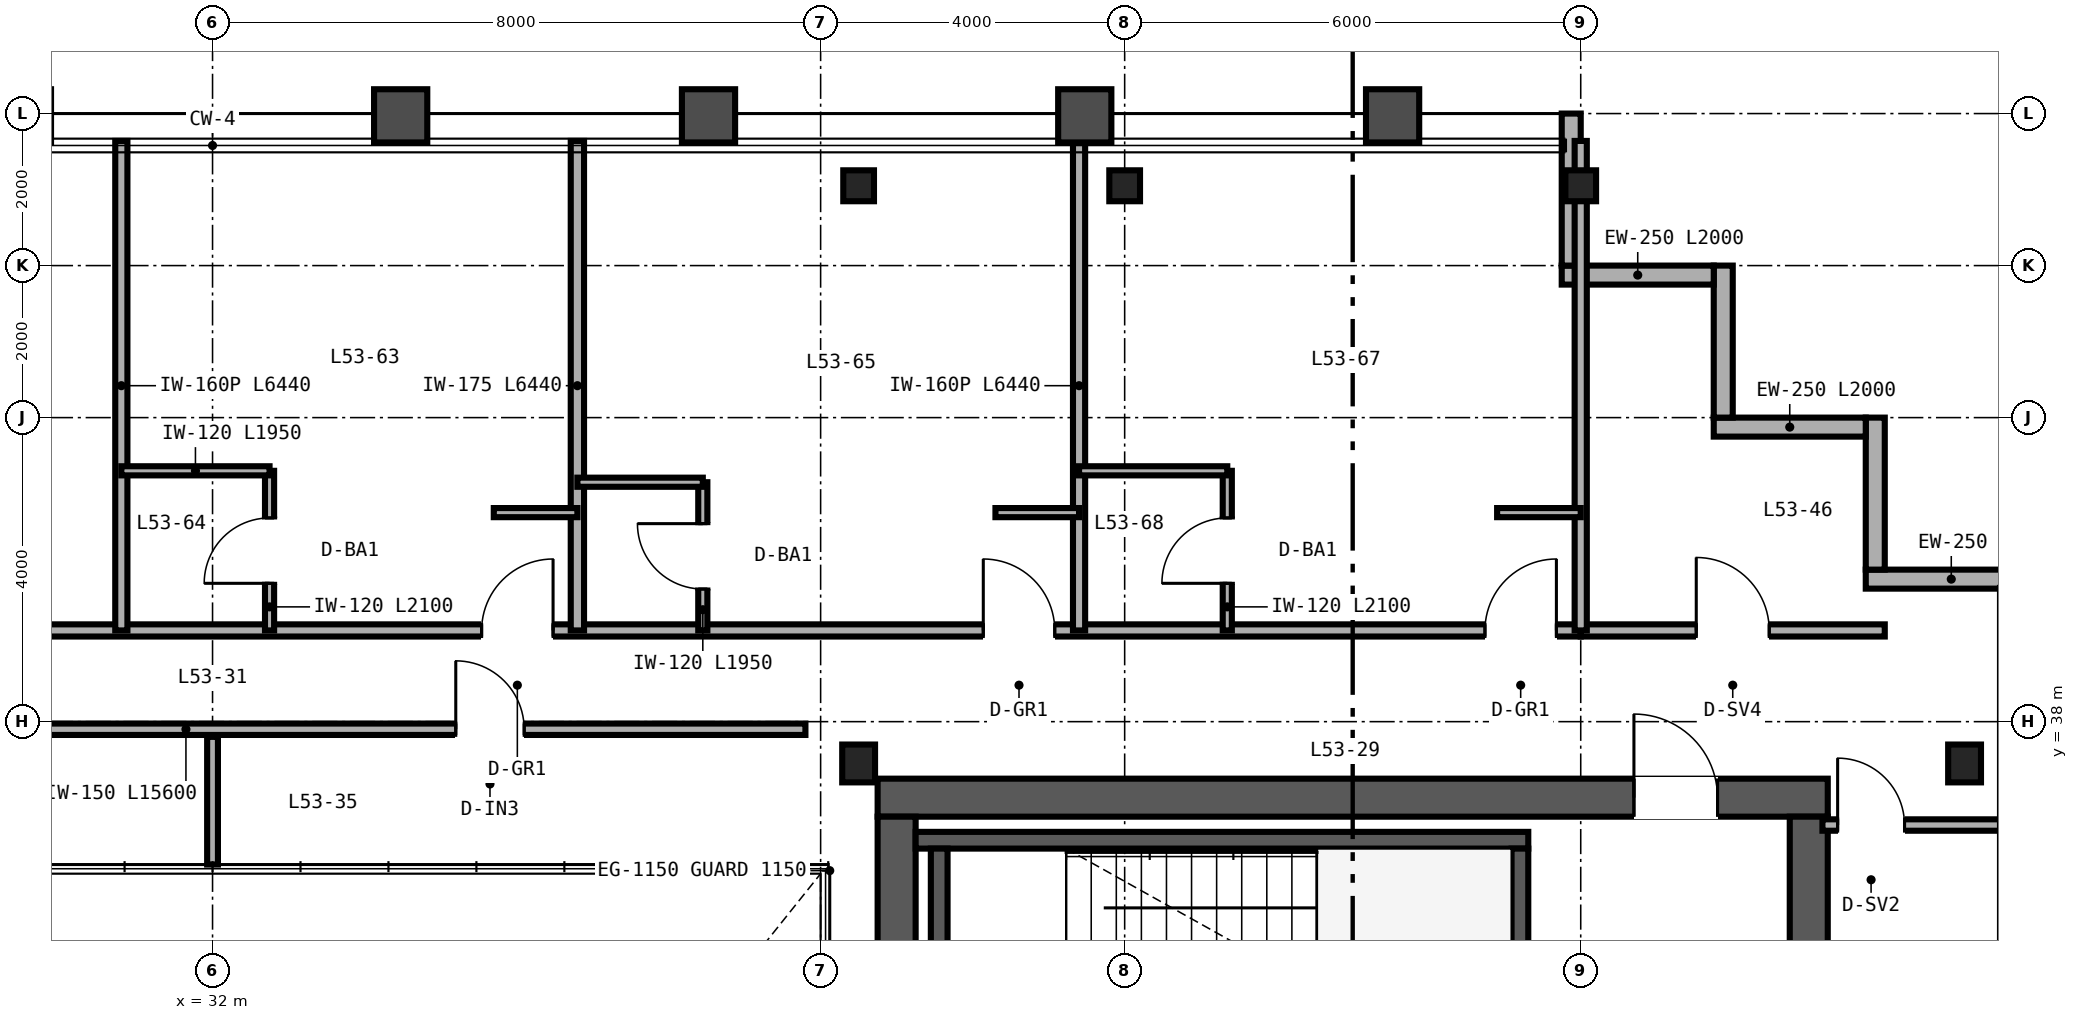
"""IFC4 building model, lengths in metres.
Left out: names, types, materials, properties, quantities, classifications, styles, units other than length and angle.
Written with IfcOpenShell. Run it as: python <this file> out.ifc"""

import sys

from ifc_helpers import new_model, si_unit, direction, frame, frame_2d, origin, origin_2d, place, context, subcontext, project, spatial, rectangle, i_section, extrude, source, transform, mapped, element, fill, save


model = new_model("IFC4")
c1 = context("Model", 3, precision=1e-05, world=origin(), true_north=direction((0.0, 1.0)))
c2 = subcontext(c1, "Body", "Model", "MODEL_VIEW")
j1 = project(units=[si_unit("LENGTHUNIT", "METRE"), si_unit("PLANEANGLEUNIT", "RADIAN")], contexts=[c1])
p1 = place(None, origin())
s1 = spatial("IfcSite", under=j1, at=p1, CompositionType="ELEMENT")
p2 = place(p1, origin())
s2 = spatial("IfcBuilding", under=s1, at=p2, CompositionType="ELEMENT")
p3 = place(p2, frame((0.0, 0.0, 210.0)))
s3 = spatial("IfcBuildingStorey", under=s2, at=p3, CompositionType="ELEMENT", Elevation=210.0)
p4 = place(p3, frame((40.75, 37.0, 0.0), z_axis=(0.0, 0.0, 1.0), x_axis=(1.0, 0.0, 0.0)))
e1 = element("IfcWall", 1, at=p4, inside=s3, PredefinedType="SHEAR", context=c2, shape_type="SweptSolid", body=[
    extrude(rectangle(XDim=12.5, YDim=0.5, at=frame_2d((6.25, 0.0))), origin(), (0.0, 0.0, 1.0), 3.37),
])
p5 = place(p4, frame((9.95, 0.0, 0.0)))
e2 = element("IfcOpeningElement", 2, at=p5, cuts=e1, PredefinedType="OPENING", context=c2, shape_type="SweptSolid", body=[
    extrude(rectangle(XDim=1.1, YDim=2.15, at=frame_2d((0.55, 1.075))), frame((0.0, 0.26, 0.0), z_axis=(0.0, -1.0, 0.0), x_axis=(1.0, 0.0, 0.0)), (0.0, 0.0, 1.0), 0.52),
])
for number, where, z_axis, x_axis in (
    (3, (41.0, 15.25, 0.0), (0.0, 0.0, 1.0), (0.0, 1.0, 0.0)),
    (4, (53.0, 15.25, 0.0), (0.0, 0.0, 1.0), (0.0, 1.0, 0.0)),
):
    element("IfcWall", number, at=place(p3, frame(where, z_axis=z_axis, x_axis=x_axis)), inside=s3, PredefinedType="SHEAR", context=c2, shape_type="SweptSolid", body=[
        extrude(rectangle(XDim=21.5, YDim=0.5, at=frame_2d((10.75, 0.0))), origin(), (0.0, 0.0, 1.0), 3.37),
    ])
p6 = place(p3, frame((41.25, 36.44, 0.0), z_axis=(0.0, 0.0, 1.0), x_axis=(1.0, 0.0, 0.0)))
e5 = element("IfcWall", 5, at=p6, inside=s3, PredefinedType="SHEAR", context=c2, shape_type="SweptSolid", body=[
    extrude(rectangle(XDim=8.06, YDim=0.22, at=frame_2d((4.03, 0.0))), origin(), (0.0, 0.0, 1.0), 3.4),
])
for number, where, z_axis, x_axis in (
    (6, (41.56, 33.05, 0.0), (0.0, 0.0, 1.0), (0.0, 1.0, 0.0)),
    (7, (49.2, 33.05, 0.0), (0.0, 0.0, 1.0), (0.0, 1.0, 0.0)),
):
    element("IfcWall", number, at=place(p3, frame(where, z_axis=z_axis, x_axis=x_axis)), inside=s3, PredefinedType="SHEAR", context=c2, shape_type="SweptSolid", body=[
        extrude(rectangle(XDim=3.28, YDim=0.22, at=frame_2d((1.64, 0.0))), origin(), (0.0, 0.0, 1.0), 3.4),
    ])
m1 = source(origin(), c2, "Body", "SweptSolid", [
    extrude(i_section(OverallWidth=0.432, OverallDepth=0.498, WebThickness=0.056, FlangeThickness=0.089, FilletRadius=0.025, at=origin_2d()), origin(), (0.0, 0.0, 1.0), 3.37),
])
for number, where, z_axis, x_axis in (
    (8, (40.5, 37.45, 0.0), (0.0, 0.0, 1.0), (1.0, 0.0, 0.0)),
    (9, (55.05, 37.45, 0.0), (0.0, 0.0, 1.0), (1.0, 0.0, 0.0)),
):
    element("IfcColumn", number, at=place(p3, frame(where, z_axis=z_axis, x_axis=x_axis)), inside=s3, PredefinedType="COLUMN", context=c2, shape_type="MappedRepresentation", body=[
        mapped(m1, transform((0.0, 0.0, 0.0), scale=1.0)),
    ])
m2 = source(origin(), c2, "Body", "SweptSolid", [
    extrude(i_section(OverallWidth=0.404, OverallDepth=0.407, WebThickness=0.027, FlangeThickness=0.044, FilletRadius=0.025, at=origin_2d()), origin(), (0.0, 0.0, 1.0), 3.37),
])
for number, where, z_axis, x_axis in (
    (10, (40.5, 45.05, 0.0), (0.0, 0.0, 1.0), (1.0, 0.0, 0.0)),
    (11, (44.0, 45.05, 0.0), (0.0, 0.0, 1.0), (1.0, 0.0, 0.0)),
    (12, (50.0, 45.05, 0.0), (0.0, 0.0, 1.0), (1.0, 0.0, 0.0)),
):
    element("IfcColumn", number, at=place(p3, frame(where, z_axis=z_axis, x_axis=x_axis)), inside=s3, PredefinedType="COLUMN", context=c2, shape_type="MappedRepresentation", body=[
        mapped(m2, transform((0.0, 0.0, 0.0), scale=1.0)),
    ])
p7 = place(p3, frame((56.0, 39.875, 0.0), z_axis=(0.0, 0.0, 1.0), x_axis=(-1.0, 0.0, 0.0)))
e13 = element("IfcWall", 13, at=p7, inside=s3, PredefinedType="SOLIDWALL", context=c2, shape_type="SweptSolid", body=[
    extrude(rectangle(XDim=2.25, YDim=0.25, at=frame_2d((1.125, 0.0))), origin(), (0.0, 0.0, 1.0), 3.37),
])
for number, where, z_axis, x_axis in (
    (14, (53.875, 40.0, 0.0), (0.0, 0.0, 1.0), (0.0, 1.0, 0.0)),
    (15, (53.75, 41.875, 0.0), (0.0, 0.0, 1.0), (-1.0, 0.0, 0.0)),
    (16, (51.875, 42.0, 0.0), (0.0, 0.0, 1.0), (0.0, 1.0, 0.0)),
    (17, (51.75, 43.875, 0.0), (0.0, 0.0, 1.0), (-1.0, 0.0, 0.0)),
):
    element("IfcWall", number, at=place(p3, frame(where, z_axis=z_axis, x_axis=x_axis)), inside=s3, PredefinedType="SOLIDWALL", context=c2, shape_type="SweptSolid", body=[
        extrude(rectangle(XDim=2.0, YDim=0.25, at=frame_2d((1.0, 0.0))), origin(), (0.0, 0.0, 1.0), 3.37),
    ])
p8 = place(p3, frame((49.875, 44.0, 0.0), z_axis=(0.0, 0.0, 1.0), x_axis=(0.0, 1.0, 0.0)))
e18 = element("IfcWall", 18, at=p8, inside=s3, PredefinedType="SOLIDWALL", context=c2, shape_type="SweptSolid", body=[
    extrude(rectangle(XDim=2.0, YDim=0.25, at=frame_2d((1.0, 0.0))), origin(), (0.0, 0.0, 1.0), 2.677),
])
p9 = place(p3, frame((24.2, 37.9, 0.0), z_axis=(0.0, 0.0, 1.0), x_axis=(1.0, 0.0, 0.0)))
e19 = element("IfcWall", 19, at=p9, inside=s3, PredefinedType="PARTITIONING", context=c2, shape_type="SweptSolid", body=[
    extrude(rectangle(XDim=15.6, YDim=0.15, at=frame_2d((7.8, 0.0))), origin(), (0.0, 0.0, 1.0), 3.37),
])
p10 = place(p9, frame((3.0, 0.0, 0.0)))
e20 = element("IfcOpeningElement", 20, at=p10, cuts=e19, PredefinedType="OPENING", context=c2, shape_type="SweptSolid", body=[
    extrude(rectangle(XDim=0.9, YDim=2.15, at=frame_2d((0.45, 1.075))), frame((0.0, 0.085, 0.0), z_axis=(0.0, -1.0, 0.0), x_axis=(1.0, 0.0, 0.0)), (0.0, 0.0, 1.0), 0.17),
])
p11 = place(p9, frame((11.0, 0.0, 0.0)))
e21 = element("IfcOpeningElement", 21, at=p11, cuts=e19, PredefinedType="OPENING", context=c2, shape_type="SweptSolid", body=[
    extrude(rectangle(XDim=0.9, YDim=2.15, at=frame_2d((0.45, 1.075))), frame((0.0, 0.085, 0.0), z_axis=(0.0, -1.0, 0.0), x_axis=(1.0, 0.0, 0.0)), (0.0, 0.0, 1.0), 0.17),
])
p12 = place(p3, frame((32.0, 36.12, 0.0), z_axis=(0.0, 0.0, 1.0), x_axis=(0.0, 1.0, 0.0)))
e22 = element("IfcWall", 22, at=p12, inside=s3, PredefinedType="PARTITIONING", context=c2, shape_type="SweptSolid", body=[
    extrude(rectangle(XDim=1.68, YDim=0.142, at=frame_2d((0.84, 0.0))), origin(), (0.0, 0.0, 1.0), 3.37),
])
p13 = place(p3, frame((53.18, 36.64, 0.0), z_axis=(0.0, 0.0, 1.0), x_axis=(1.0, 0.0, 0.0)))
e23 = element("IfcWall", 23, at=p13, inside=s3, PredefinedType="PARTITIONING", context=c2, shape_type="SweptSolid", body=[
    extrude(rectangle(XDim=2.66, YDim=0.15, at=frame_2d((1.33, 0.0))), origin(), (0.0, 0.0, 1.0), 2.753),
])
p14 = place(p13, frame((0.2, 0.0, 0.0)))
e24 = element("IfcOpeningElement", 24, at=p14, cuts=e23, PredefinedType="OPENING", context=c2, shape_type="SweptSolid", body=[
    extrude(rectangle(XDim=0.88, YDim=2.15, at=frame_2d((0.44, 1.075))), frame((0.0, 0.085, 0.0), z_axis=(0.0, -1.0, 0.0), x_axis=(1.0, 0.0, 0.0)), (0.0, 0.0, 1.0), 0.17),
])
p15 = place(p3, frame((50.0, 39.2, 0.0), z_axis=(0.0, 0.0, 1.0), x_axis=(1.0, 0.0, 0.0)))
e25 = element("IfcWall", 25, at=p15, inside=s3, PredefinedType="PARTITIONING", context=c2, shape_type="SweptSolid", body=[
    extrude(rectangle(XDim=4.0, YDim=0.16, at=frame_2d((2.0, 0.0))), origin(), (0.0, 0.0, 1.0), 3.37),
])
p16 = place(p15, frame((1.52, 0.0, 0.0)))
e26 = element("IfcOpeningElement", 26, at=p16, cuts=e25, PredefinedType="OPENING", context=c2, shape_type="SweptSolid", body=[
    extrude(rectangle(XDim=0.96, YDim=2.15, at=frame_2d((0.48, 1.075))), frame((0.0, 0.09, 0.0), z_axis=(0.0, -1.0, 0.0), x_axis=(1.0, 0.0, 0.0)), (0.0, 0.0, 1.0), 0.18),
])
p17 = place(p3, frame((14.0, 39.2, 0.0), z_axis=(0.0, 0.0, 1.0), x_axis=(1.0, 0.0, 0.0)))
e27 = element("IfcWall", 27, at=p17, inside=s3, PredefinedType="PARTITIONING", context=c2, shape_type="SweptSolid", body=[
    extrude(rectangle(XDim=36.0, YDim=0.16, at=frame_2d((18.0, 0.0))), origin(), (0.0, 0.0, 1.0), 2.913),
])
p18 = place(p17, frame((4.14, 0.0, 0.0)))
e28 = element("IfcOpeningElement", 28, at=p18, cuts=e27, PredefinedType="OPENING", context=c2, shape_type="SweptSolid", body=[
    extrude(rectangle(XDim=0.94, YDim=2.15, at=frame_2d((0.47, 1.075))), frame((0.0, 0.09, 0.0), z_axis=(0.0, -1.0, 0.0), x_axis=(1.0, 0.0, 0.0)), (0.0, 0.0, 1.0), 0.18),
])
p19 = place(p17, frame((9.54, 0.0, 0.0)))
e29 = element("IfcOpeningElement", 29, at=p19, cuts=e27, PredefinedType="OPENING", context=c2, shape_type="SweptSolid", body=[
    extrude(rectangle(XDim=0.94, YDim=2.15, at=frame_2d((0.47, 1.075))), frame((0.0, 0.09, 0.0), z_axis=(0.0, -1.0, 0.0), x_axis=(1.0, 0.0, 0.0)), (0.0, 0.0, 1.0), 0.18),
])
p20 = place(p17, frame((13.32, 0.0, 0.0)))
e30 = element("IfcOpeningElement", 30, at=p20, cuts=e27, PredefinedType="OPENING", context=c2, shape_type="SweptSolid", body=[
    extrude(rectangle(XDim=0.96, YDim=2.15, at=frame_2d((0.48, 1.075))), frame((0.0, 0.09, 0.0), z_axis=(0.0, -1.0, 0.0), x_axis=(1.0, 0.0, 0.0)), (0.0, 0.0, 1.0), 0.18),
])
p21 = place(p17, frame((21.54, 0.0, 0.0)))
e31 = element("IfcOpeningElement", 31, at=p21, cuts=e27, PredefinedType="OPENING", context=c2, shape_type="SweptSolid", body=[
    extrude(rectangle(XDim=0.94, YDim=2.15, at=frame_2d((0.47, 1.075))), frame((0.0, 0.09, 0.0), z_axis=(0.0, -1.0, 0.0), x_axis=(1.0, 0.0, 0.0)), (0.0, 0.0, 1.0), 0.18),
])
p22 = place(p17, frame((28.14, 0.0, 0.0)))
e32 = element("IfcOpeningElement", 32, at=p22, cuts=e27, PredefinedType="OPENING", context=c2, shape_type="SweptSolid", body=[
    extrude(rectangle(XDim=0.94, YDim=2.15, at=frame_2d((0.47, 1.075))), frame((0.0, 0.09, 0.0), z_axis=(0.0, -1.0, 0.0), x_axis=(1.0, 0.0, 0.0)), (0.0, 0.0, 1.0), 0.18),
])
p23 = place(p17, frame((34.74, 0.0, 0.0)))
e33 = element("IfcOpeningElement", 33, at=p23, cuts=e27, PredefinedType="OPENING", context=c2, shape_type="SweptSolid", body=[
    extrude(rectangle(XDim=0.94, YDim=2.15, at=frame_2d((0.47, 1.075))), frame((0.0, 0.09, 0.0), z_axis=(0.0, -1.0, 0.0), x_axis=(1.0, 0.0, 0.0)), (0.0, 0.0, 1.0), 0.18),
])
p24 = place(p3, frame((50.0, 39.2, 0.0), z_axis=(0.0, 0.0, 1.0), x_axis=(0.0, 1.0, 0.0)))
e34 = element("IfcWall", 34, at=p24, inside=s3, PredefinedType="PARTITIONING", context=c2, shape_type="SweptSolid", body=[
    extrude(rectangle(XDim=6.44, YDim=0.16, at=frame_2d((3.22, 0.0))), origin(), (0.0, 0.0, 1.0), 2.677),
])
p25 = place(p3, frame((30.8, 39.2, 0.0), z_axis=(0.0, 0.0, 1.0), x_axis=(0.0, 1.0, 0.0)))
e35 = element("IfcWall", 35, at=p25, inside=s3, PredefinedType="PARTITIONING", context=c2, shape_type="SweptSolid", body=[
    extrude(rectangle(XDim=6.44, YDim=0.16, at=frame_2d((3.22, 0.0))), origin(), (0.0, 0.0, 1.0), 2.443),
])
p26 = place(p3, frame((36.8, 39.2, 0.0), z_axis=(0.0, 0.0, 1.0), x_axis=(0.0, 1.0, 0.0)))
e36 = element("IfcWall", 36, at=p26, inside=s3, PredefinedType="PARTITIONING", context=c2, shape_type="SweptSolid", body=[
    extrude(rectangle(XDim=6.44, YDim=0.175, at=frame_2d((3.22, 0.0))), origin(), (0.0, 0.0, 1.0), 2.443),
])
p27 = place(p3, frame((32.75, 39.2, 0.0), z_axis=(0.0, 0.0, 1.0), x_axis=(0.0, 1.0, 0.0)))
e37 = element("IfcWall", 37, at=p27, inside=s3, PredefinedType="PARTITIONING", context=c2, shape_type="SweptSolid", body=[
    extrude(rectangle(XDim=2.1, YDim=0.12, at=frame_2d((1.05, 0.0))), origin(), (0.0, 0.0, 1.0), 3.37),
])
p28 = place(p27, frame((0.62, 0.0, 0.0)))
e38 = element("IfcOpeningElement", 38, at=p28, cuts=e37, PredefinedType="OPENING", context=c2, shape_type="SweptSolid", body=[
    extrude(rectangle(XDim=0.86, YDim=2.1, at=frame_2d((0.43, 1.05))), frame((0.0, 0.07, 0.0), z_axis=(0.0, -1.0, 0.0), x_axis=(1.0, 0.0, 0.0)), (0.0, 0.0, 1.0), 0.14),
])
p29 = place(p3, frame((30.8, 41.3, 0.0), z_axis=(0.0, 0.0, 1.0), x_axis=(1.0, 0.0, 0.0)))
e39 = element("IfcWall", 39, at=p29, inside=s3, PredefinedType="PARTITIONING", context=c2, shape_type="SweptSolid", body=[
    extrude(rectangle(XDim=1.95, YDim=0.12, at=frame_2d((0.975, 0.0))), origin(), (0.0, 0.0, 1.0), 3.37),
])
p30 = place(p3, frame((35.7, 40.75, 0.0), z_axis=(0.0, 0.0, 1.0), x_axis=(1.0, 0.0, 0.0)))
e40 = element("IfcWall", 40, at=p30, inside=s3, PredefinedType="PARTITIONING", context=c2, shape_type="SweptSolid", body=[
    extrude(rectangle(XDim=1.1, YDim=0.12, at=frame_2d((0.55, 0.0))), origin(), (0.0, 0.0, 1.0), 3.37),
])
p31 = place(p3, frame((43.4, 39.2, 0.0), z_axis=(0.0, 0.0, 1.0), x_axis=(0.0, 1.0, 0.0)))
e41 = element("IfcWall", 41, at=p31, inside=s3, PredefinedType="PARTITIONING", context=c2, shape_type="SweptSolid", body=[
    extrude(rectangle(XDim=6.44, YDim=0.16, at=frame_2d((3.22, 0.0))), origin(), (0.0, 0.0, 1.0), 2.833),
])
p32 = place(p3, frame((38.45, 39.2, 0.0), z_axis=(0.0, 0.0, 1.0), x_axis=(0.0, 1.0, 0.0)))
e42 = element("IfcWall", 42, at=p32, inside=s3, PredefinedType="PARTITIONING", context=c2, shape_type="SweptSolid", body=[
    extrude(rectangle(XDim=1.95, YDim=0.12, at=frame_2d((0.975, 0.0))), origin(), (0.0, 0.0, 1.0), 3.37),
])
p33 = place(p32, frame((0.545, 0.0, 0.0)))
e43 = element("IfcOpeningElement", 43, at=p33, cuts=e42, PredefinedType="OPENING", context=c2, shape_type="SweptSolid", body=[
    extrude(rectangle(XDim=0.86, YDim=2.1, at=frame_2d((0.43, 1.05))), frame((0.0, 0.07, 0.0), z_axis=(0.0, -1.0, 0.0), x_axis=(1.0, 0.0, 0.0)), (0.0, 0.0, 1.0), 0.14),
])
p34 = place(p3, frame((36.8, 41.15, 0.0), z_axis=(0.0, 0.0, 1.0), x_axis=(1.0, 0.0, 0.0)))
e44 = element("IfcWall", 44, at=p34, inside=s3, PredefinedType="PARTITIONING", context=c2, shape_type="SweptSolid", body=[
    extrude(rectangle(XDim=1.65, YDim=0.12, at=frame_2d((0.825, 0.0))), origin(), (0.0, 0.0, 1.0), 3.37),
])
p35 = place(p3, frame((42.3, 40.75, 0.0), z_axis=(0.0, 0.0, 1.0), x_axis=(1.0, 0.0, 0.0)))
e45 = element("IfcWall", 45, at=p35, inside=s3, PredefinedType="PARTITIONING", context=c2, shape_type="SweptSolid", body=[
    extrude(rectangle(XDim=1.1, YDim=0.12, at=frame_2d((0.55, 0.0))), origin(), (0.0, 0.0, 1.0), 3.37),
])
p36 = place(p3, frame((45.35, 39.2, 0.0), z_axis=(0.0, 0.0, 1.0), x_axis=(0.0, 1.0, 0.0)))
e46 = element("IfcWall", 46, at=p36, inside=s3, PredefinedType="PARTITIONING", context=c2, shape_type="SweptSolid", body=[
    extrude(rectangle(XDim=2.1, YDim=0.12, at=frame_2d((1.05, 0.0))), origin(), (0.0, 0.0, 1.0), 3.37),
])
p37 = place(p36, frame((0.62, 0.0, 0.0)))
e47 = element("IfcOpeningElement", 47, at=p37, cuts=e46, PredefinedType="OPENING", context=c2, shape_type="SweptSolid", body=[
    extrude(rectangle(XDim=0.86, YDim=2.1, at=frame_2d((0.43, 1.05))), frame((0.0, 0.07, 0.0), z_axis=(0.0, -1.0, 0.0), x_axis=(1.0, 0.0, 0.0)), (0.0, 0.0, 1.0), 0.14),
])
p38 = place(p3, frame((43.4, 41.3, 0.0), z_axis=(0.0, 0.0, 1.0), x_axis=(1.0, 0.0, 0.0)))
e48 = element("IfcWall", 48, at=p38, inside=s3, PredefinedType="PARTITIONING", context=c2, shape_type="SweptSolid", body=[
    extrude(rectangle(XDim=1.95, YDim=0.12, at=frame_2d((0.975, 0.0))), origin(), (0.0, 0.0, 1.0), 3.37),
])
p39 = place(p3, frame((48.9, 40.75, 0.0), z_axis=(0.0, 0.0, 1.0), x_axis=(1.0, 0.0, 0.0)))
e49 = element("IfcWall", 49, at=p39, inside=s3, PredefinedType="PARTITIONING", context=c2, shape_type="SweptSolid", body=[
    extrude(rectangle(XDim=1.1, YDim=0.12, at=frame_2d((0.55, 0.0))), origin(), (0.0, 0.0, 1.0), 3.37),
])
m3 = source(origin(), c2, "Body", "SweptSolid", [
    extrude(rectangle(XDim=1.1, YDim=2.15, at=frame_2d((0.55, 1.075))), frame((0.0, 0.025, 0.0), z_axis=(0.0, -1.0, 0.0), x_axis=(1.0, 0.0, 0.0)), (0.0, 0.0, 1.0), 0.05),
])
p40 = place(p5, origin())
e50 = element("IfcDoor", 50, at=p40, inside=s3, OperationType="SINGLE_SWING_LEFT", PredefinedType="DOOR", context=c2, shape_type="MappedRepresentation", body=[
    mapped(m3, transform((0.0, 0.0, 0.0), scale=1.0)),
])
fill(e2, e50)
m4 = source(origin(), c2, "Body", "SweptSolid", [
    extrude(rectangle(XDim=0.9, YDim=2.15, at=frame_2d((0.45, 1.075))), frame((0.0, 0.025, 0.0), z_axis=(0.0, -1.0, 0.0), x_axis=(1.0, 0.0, 0.0)), (0.0, 0.0, 1.0), 0.05),
])
p41 = place(p11, origin())
e51 = element("IfcDoor", 51, at=p41, inside=s3, OperationType="SINGLE_SWING_LEFT", PredefinedType="DOOR", context=c2, shape_type="MappedRepresentation", body=[
    mapped(m4, transform((0.0, 0.0, 0.0), scale=1.0)),
])
fill(e21, e51)
m5 = source(origin(), c2, "Body", "SweptSolid", [
    extrude(rectangle(XDim=0.88, YDim=2.15, at=frame_2d((0.44, 1.075))), frame((0.0, 0.025, 0.0), z_axis=(0.0, -1.0, 0.0), x_axis=(1.0, 0.0, 0.0)), (0.0, 0.0, 1.0), 0.05),
])
p42 = place(p14, origin())
e52 = element("IfcDoor", 52, at=p42, inside=s3, OperationType="SINGLE_SWING_LEFT", PredefinedType="DOOR", context=c2, shape_type="MappedRepresentation", body=[
    mapped(m5, transform((0.0, 0.0, 0.0), scale=1.0)),
])
fill(e24, e52)
m6 = source(origin(), c2, "Body", "SweptSolid", [
    extrude(rectangle(XDim=0.96, YDim=2.15, at=frame_2d((0.48, 1.075))), frame((0.0, 0.025, 0.0), z_axis=(0.0, -1.0, 0.0), x_axis=(1.0, 0.0, 0.0)), (0.0, 0.0, 1.0), 0.05),
])
p43 = place(p16, origin())
e53 = element("IfcDoor", 53, at=p43, inside=s3, OperationType="SINGLE_SWING_LEFT", PredefinedType="DOOR", context=c2, shape_type="MappedRepresentation", body=[
    mapped(m6, transform((0.0, 0.0, 0.0), scale=1.0)),
])
fill(e26, e53)
m7 = source(origin(), c2, "Body", "SweptSolid", [
    extrude(rectangle(XDim=0.86, YDim=2.1, at=frame_2d((0.43, 1.05))), frame((0.0, 0.025, 0.0), z_axis=(0.0, -1.0, 0.0), x_axis=(1.0, 0.0, 0.0)), (0.0, 0.0, 1.0), 0.05),
])
p44 = place(p28, origin())
e54 = element("IfcDoor", 54, at=p44, inside=s3, OperationType="SINGLE_SWING_LEFT", PredefinedType="DOOR", context=c2, shape_type="MappedRepresentation", body=[
    mapped(m7, transform((0.0, 0.0, 0.0), scale=1.0)),
])
fill(e38, e54)
p45 = place(p33, origin())
e55 = element("IfcDoor", 55, at=p45, inside=s3, OperationType="SINGLE_SWING_RIGHT", PredefinedType="DOOR", context=c2, shape_type="MappedRepresentation", body=[
    mapped(m7, transform((0.0, 0.0, 0.0), scale=1.0)),
])
fill(e43, e55)
p46 = place(p37, origin())
e56 = element("IfcDoor", 56, at=p46, inside=s3, OperationType="SINGLE_SWING_LEFT", PredefinedType="DOOR", context=c2, shape_type="MappedRepresentation", body=[
    mapped(m7, transform((0.0, 0.0, 0.0), scale=1.0)),
])
fill(e47, e56)
m8 = source(origin(), c2, "Body", "SweptSolid", [
    extrude(rectangle(XDim=0.94, YDim=2.15, at=frame_2d((0.47, 1.075))), frame((0.0, 0.025, 0.0), z_axis=(0.0, -1.0, 0.0), x_axis=(1.0, 0.0, 0.0)), (0.0, 0.0, 1.0), 0.05),
])
p47 = place(p21, origin())
e57 = element("IfcDoor", 57, at=p47, inside=s3, OperationType="SINGLE_SWING_RIGHT", PredefinedType="DOOR", context=c2, shape_type="MappedRepresentation", body=[
    mapped(m8, transform((0.0, 0.0, 0.0), scale=1.0)),
])
fill(e31, e57)
p48 = place(p22, origin())
e58 = element("IfcDoor", 58, at=p48, inside=s3, OperationType="SINGLE_SWING_LEFT", PredefinedType="DOOR", context=c2, shape_type="MappedRepresentation", body=[
    mapped(m8, transform((0.0, 0.0, 0.0), scale=1.0)),
])
fill(e32, e58)
p49 = place(p23, origin())
e59 = element("IfcDoor", 59, at=p49, inside=s3, OperationType="SINGLE_SWING_RIGHT", PredefinedType="DOOR", context=c2, shape_type="MappedRepresentation", body=[
    mapped(m8, transform((0.0, 0.0, 0.0), scale=1.0)),
])
fill(e33, e59)
save(model, sys.argv[1])
